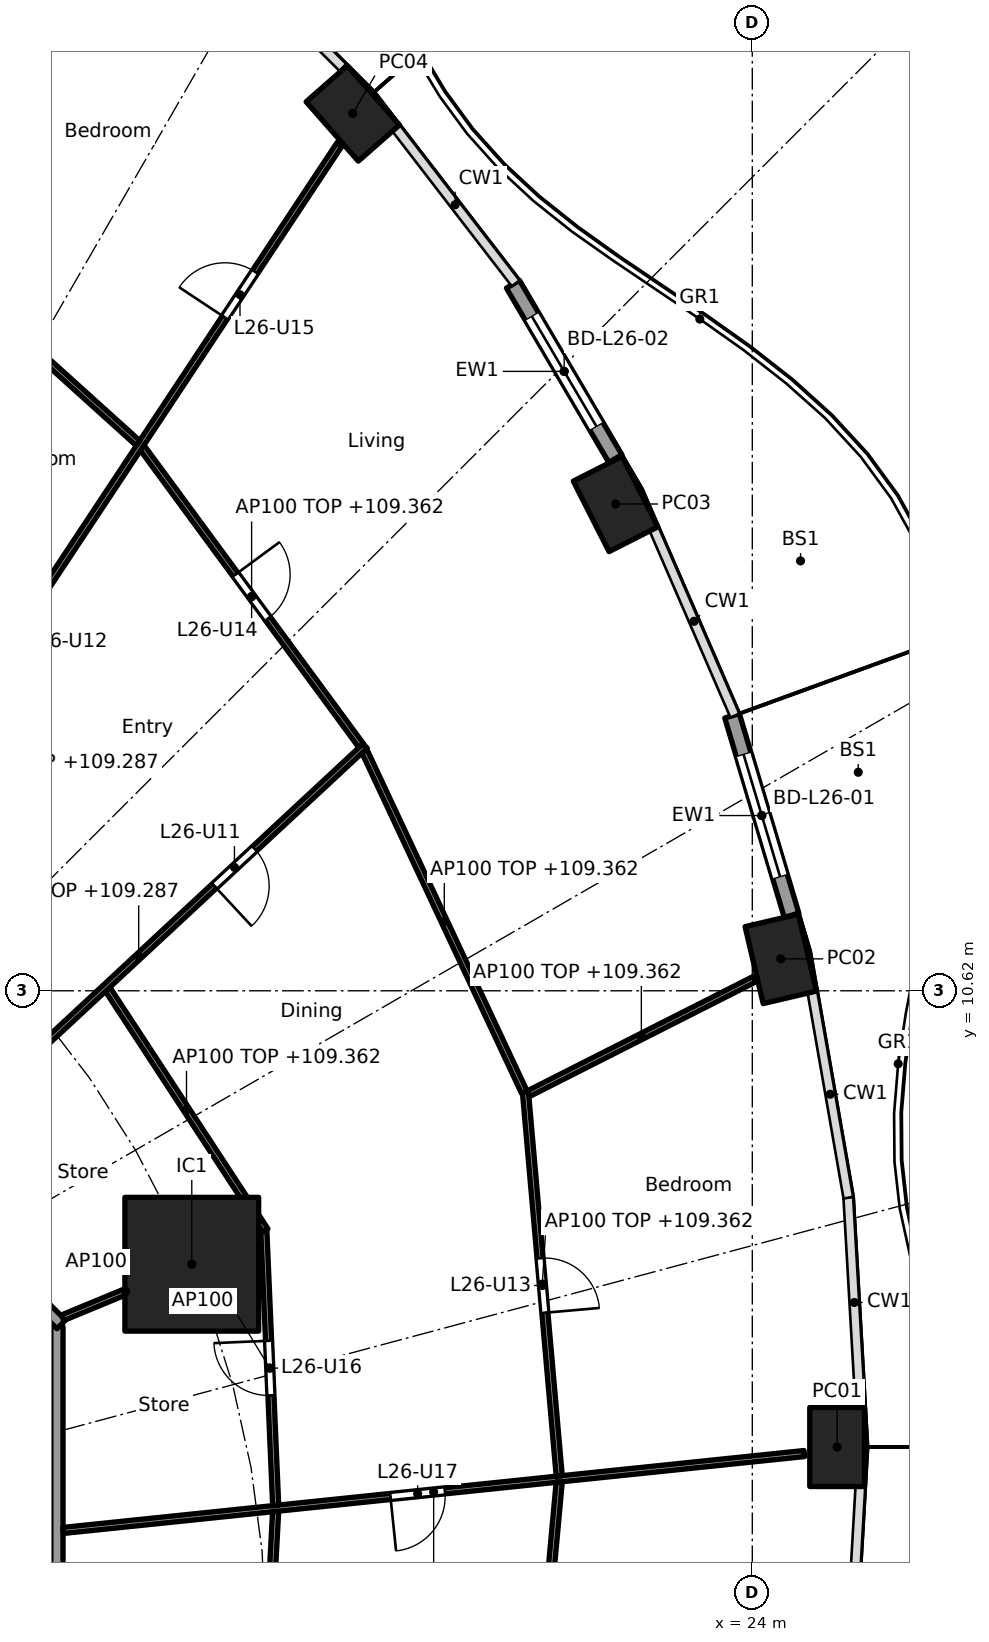
"""IFC4 building model, lengths in metres.
Left out: names, types, materials, properties, quantities, classifications, styles, units other than length and angle.
Written with IfcOpenShell. Run it as: python <this file> out.ifc"""

import sys

from ifc_helpers import new_model, si_unit, direction, frame, frame_2d, origin, origin_2d, place, context, subcontext, project, spatial, rectangle, hollow_rectangle, extrude, element, fill, save


model = new_model("IFC4")
c1 = context("Model", 3, precision=1e-05, world=origin(), true_north=direction((0.0, 1.0)))
c2 = subcontext(c1, "Body", "Model", "MODEL_VIEW")
j1 = project(units=[si_unit("LENGTHUNIT", "METRE"), si_unit("PLANEANGLEUNIT", "RADIAN")], contexts=[c1])
p1 = place(None, origin())
s1 = spatial("IfcSite", under=j1, at=p1, CompositionType="ELEMENT")
p2 = place(p1, origin())
s2 = spatial("IfcBuilding", under=s1, at=p2, CompositionType="ELEMENT")
p3 = place(p2, frame((0.0, 0.0, 106.6)))
s3 = spatial("IfcBuildingStorey", under=s2, at=p3, CompositionType="ELEMENT", Elevation=106.6)
for number, where, z_axis, x_axis in (
    (1, (25.395, 3.118, 0.0), (0.0, 0.0, 1.0), (0.0, 1.0, 0.0)),
    (2, (24.468, 11.145, 0.0), (0.0, 0.0, 1.0), (-0.229, 0.973, 0.0)),
    (3, (21.751, 18.625, 0.0), (0.0, 0.0, 1.0), (-0.452, 0.892, 0.0)),
    (4, (17.43, 25.049, 0.0), (0.0, 0.0, 1.0), (-0.66, 0.751, 0.0)),
):
    element("IfcColumn", number, at=place(p3, frame(where, z_axis=z_axis, x_axis=x_axis)), inside=s3, PredefinedType="COLUMN", context=c2, shape_type="SweptSolid", body=[
        extrude(hollow_rectangle(XDim=1.3, YDim=0.9, WallThickness=0.045, at=origin_2d()), origin(), (0.0, 0.0, 1.0), 3.7),
    ])
p4 = place(p3, frame((14.782, 6.123, 0.0), z_axis=(0.0, 0.0, 1.0), x_axis=(1.0, 0.0, 0.0)))
e5 = element("IfcColumn", 5, at=p4, inside=s3, PredefinedType="COLUMN", context=c2, shape_type="SweptSolid", body=[
    extrude(rectangle(XDim=2.2, YDim=2.2, at=origin_2d()), origin(), (0.0, 0.0, 1.0), 3.7),
])
p5 = place(p3, frame((23.667, 15.142, 0.0), z_axis=(0.0, 0.0, 1.0), x_axis=(0.285882094477, -0.958264800594, 0.0)))
e6 = element("IfcWall", 6, at=p5, inside=s3, PredefinedType="SOLIDWALL", context=c2, shape_type="SweptSolid", body=[
    extrude(rectangle(XDim=3.424, YDim=0.25, at=frame_2d((1.712, 0.0))), origin(), (0.0, 0.0, 1.0), 3.44),
])
p6 = place(p5, frame((0.662, 0.0, 0.0)))
e7 = element("IfcOpeningElement", 7, at=p6, cuts=e6, PredefinedType="OPENING", context=c2, shape_type="SweptSolid", body=[
    extrude(rectangle(XDim=2.1, YDim=2.4, at=frame_2d((1.05, 1.2))), frame((0.0, 0.135, 0.0), z_axis=(0.0, -1.0, 0.0), x_axis=(1.0, 0.0, 0.0)), (0.0, 0.0, 1.0), 0.27),
])
p7 = place(p3, frame((20.064, 22.24, 0.0), z_axis=(0.0, 0.0, 1.0), x_axis=(0.506297921217, -0.862358634775, 0.0)))
e8 = element("IfcWall", 8, at=p7, inside=s3, PredefinedType="SOLIDWALL", context=c2, shape_type="SweptSolid", body=[
    extrude(rectangle(XDim=3.325, YDim=0.25, at=frame_2d((1.662, 0.0))), origin(), (0.0, 0.0, 1.0), 3.44),
])
p8 = place(p7, frame((0.612, 0.0, 0.0)))
e9 = element("IfcOpeningElement", 9, at=p8, cuts=e8, PredefinedType="OPENING", context=c2, shape_type="SweptSolid", body=[
    extrude(rectangle(XDim=2.1, YDim=2.4, at=frame_2d((1.05, 1.2))), frame((0.0, 0.135, 0.0), z_axis=(0.0, -1.0, 0.0), x_axis=(1.0, 0.0, 0.0)), (0.0, 0.0, 1.0), 0.27),
])
p9 = place(p3, frame((12.565, -5.104, 0.0), z_axis=(0.0, 0.0, 1.0), x_axis=(0.0, 1.0, 0.0)))
e10 = element("IfcWall", 10, at=p9, inside=s3, PredefinedType="PARTITIONING", context=c2, shape_type="SweptSolid", body=[
    extrude(rectangle(XDim=10.209, YDim=0.2, at=frame_2d((5.104, 0.0))), origin(), (0.0, 0.0, 1.0), 3.44),
])
p10 = place(p3, frame((12.635, 5.134, 0.0), z_axis=(0.0, 0.0, 1.0), x_axis=(-0.707106781187, 0.707106781187, 0.0)))
e11 = element("IfcWall", 11, at=p10, inside=s3, PredefinedType="PARTITIONING", context=c2, shape_type="SweptSolid", body=[
    extrude(rectangle(XDim=10.609, YDim=0.2, at=frame_2d((5.305, 0.0))), origin(), (0.0, 0.0, 1.0), 3.44),
])
p11 = place(p10, frame((4.804, 0.0, 0.0)))
e12 = element("IfcOpeningElement", 12, at=p11, cuts=e11, PredefinedType="OPENING", context=c2, shape_type="SweptSolid", body=[
    extrude(rectangle(XDim=1.0, YDim=2.1, at=frame_2d((0.5, 1.05))), frame((0.0, 0.11, 0.0), z_axis=(0.0, -1.0, 0.0), x_axis=(1.0, 0.0, 0.0)), (0.0, 0.0, 1.0), 0.22),
])
p12 = place(p3, frame((12.664, 1.745, 0.0), z_axis=(0.0, 0.0, 1.0), x_axis=(0.994662790212, 0.103179134358, 0.0)))
e13 = element("IfcWall", 13, at=p12, inside=s3, PredefinedType="PARTITIONING", context=c2, shape_type="SweptSolid", body=[
    extrude(rectangle(XDim=12.257, YDim=0.1, at=frame_2d((6.128, 0.0))), origin(), (0.0, 0.0, 1.0), 2.687),
])
p13 = place(p12, frame((5.414, 0.0, 0.0)))
e14 = element("IfcOpeningElement", 14, at=p13, cuts=e13, PredefinedType="OPENING", context=c2, shape_type="SweptSolid", body=[
    extrude(rectangle(XDim=0.9, YDim=2.1, at=frame_2d((0.45, 1.05))), frame((0.0, 0.06, 0.0), z_axis=(0.0, -1.0, 0.0), x_axis=(1.0, 0.0, 0.0)), (0.0, 0.0, 1.0), 0.12),
])
p14 = place(p3, frame((16.162, 2.158, 0.0), z_axis=(0.0, 0.0, 1.0), x_axis=(-0.043120653248, 0.999069872063, 0.0)))
e15 = element("IfcWall", 15, at=p14, inside=s3, PredefinedType="PARTITIONING", context=c2, shape_type="SweptSolid", body=[
    extrude(rectangle(XDim=4.518, YDim=0.1, at=frame_2d((2.259, 0.0))), origin(), (0.0, 0.0, 1.0), 3.44),
])
p15 = place(p14, frame((1.809, 0.0, 0.0)))
e16 = element("IfcOpeningElement", 16, at=p15, cuts=e15, PredefinedType="OPENING", context=c2, shape_type="SweptSolid", body=[
    extrude(rectangle(XDim=0.9, YDim=2.1, at=frame_2d((0.45, 1.05))), frame((0.0, 0.06, 0.0), z_axis=(0.0, -1.0, 0.0), x_axis=(1.0, 0.0, 0.0)), (0.0, 0.0, 1.0), 0.12),
])
p16 = place(p3, frame((16.161, 2.058, 0.0), z_axis=(0.0, 0.0, 1.0), x_axis=(-0.053696394729, -0.998557307916, 0.0)))
e17 = element("IfcWall", 17, at=p16, inside=s3, PredefinedType="PARTITIONING", context=c2, shape_type="SweptSolid", body=[
    extrude(rectangle(XDim=4.742, YDim=0.1, at=frame_2d((2.371, 0.0))), origin(), (0.0, 0.0, 1.0), 2.762),
])
p17 = place(p16, frame((1.896, 0.0, 0.0)))
e18 = element("IfcOpeningElement", 18, at=p17, cuts=e17, PredefinedType="OPENING", context=c2, shape_type="SweptSolid", body=[
    extrude(rectangle(XDim=0.9, YDim=2.1, at=frame_2d((0.45, 1.05))), frame((0.0, 0.06, 0.0), z_axis=(0.0, -1.0, 0.0), x_axis=(1.0, 0.0, 0.0)), (0.0, 0.0, 1.0), 0.12),
])
p18 = place(p3, frame((20.825, 2.642, 0.0), z_axis=(0.0, 0.0, 1.0), x_axis=(-0.08776338161, 0.996141349834, 0.0)))
e19 = element("IfcWall", 19, at=p18, inside=s3, PredefinedType="PARTITIONING", context=c2, shape_type="SweptSolid", body=[
    extrude(rectangle(XDim=6.337, YDim=0.1, at=frame_2d((3.168, 0.0))), origin(), (0.0, 0.0, 1.0), 2.762),
])
p19 = place(p18, frame((2.694, 0.0, 0.0)))
e20 = element("IfcOpeningElement", 20, at=p19, cuts=e19, PredefinedType="OPENING", context=c2, shape_type="SweptSolid", body=[
    extrude(rectangle(XDim=0.9, YDim=2.1, at=frame_2d((0.45, 1.05))), frame((0.0, 0.06, 0.0), z_axis=(0.0, -1.0, 0.0), x_axis=(1.0, 0.0, 0.0)), (0.0, 0.0, 1.0), 0.12),
])
p20 = place(p3, frame((20.825, 2.542, 0.0), z_axis=(0.0, 0.0, 1.0), x_axis=(-0.09140211812, -0.995814065377, 0.0)))
e21 = element("IfcWall", 21, at=p20, inside=s3, PredefinedType="PARTITIONING", context=c2, shape_type="SweptSolid", body=[
    extrude(rectangle(XDim=6.403, YDim=0.1, at=frame_2d((3.201, 0.0))), origin(), (0.0, 0.0, 1.0), 2.762),
])
p21 = place(p20, frame((2.726, 0.0, 0.0)))
e22 = element("IfcOpeningElement", 22, at=p21, cuts=e21, PredefinedType="OPENING", context=c2, shape_type="SweptSolid", body=[
    extrude(rectangle(XDim=0.9, YDim=2.1, at=frame_2d((0.45, 1.05))), frame((0.0, 0.06, 0.0), z_axis=(0.0, -1.0, 0.0), x_axis=(1.0, 0.0, 0.0)), (0.0, 0.0, 1.0), 0.12),
])
p22 = place(p3, frame((12.657, 5.243, 0.0), z_axis=(0.0, 0.0, 1.0), x_axis=(0.923864733477, 0.382719158442, 0.0)))
e23 = element("IfcWall", 23, at=p22, inside=s3, PredefinedType="PARTITIONING", context=c2, shape_type="SweptSolid", body=[
    extrude(rectangle(XDim=2.25, YDim=0.1, at=frame_2d((1.125, 0.0))), origin(), (0.0, 0.0, 1.0), 3.44),
])
p23 = place(p3, frame((15.992, 6.68, 0.0), z_axis=(0.0, 0.0, 1.0), x_axis=(-0.547472878942, 0.836823426311, 0.0)))
e24 = element("IfcWall", 24, at=p23, inside=s3, PredefinedType="PARTITIONING", context=c2, shape_type="SweptSolid", body=[
    extrude(rectangle(XDim=4.738, YDim=0.1, at=frame_2d((2.369, 0.0))), origin(), (0.0, 0.0, 1.0), 2.762),
])
p24 = place(p3, frame((20.318, 8.927, 0.0), z_axis=(0.0, 0.0, 1.0), x_axis=(0.892057836959, 0.451921249246, 0.0)))
e25 = element("IfcWall", 25, at=p24, inside=s3, PredefinedType="PARTITIONING", context=c2, shape_type="SweptSolid", body=[
    extrude(rectangle(XDim=4.164, YDim=0.1, at=frame_2d((2.082, 0.0))), origin(), (0.0, 0.0, 1.0), 2.762),
])
p25 = place(p3, frame((20.252, 8.95, 0.0), z_axis=(0.0, 0.0, 1.0), x_axis=(-0.424580052627, 0.90539040138, 0.0)))
e26 = element("IfcWall", 26, at=p25, inside=s3, PredefinedType="PARTITIONING", context=c2, shape_type="SweptSolid", body=[
    extrude(rectangle(XDim=6.204, YDim=0.1, at=frame_2d((3.102, 0.0))), origin(), (0.0, 0.0, 1.0), 2.762),
])
p26 = place(p3, frame((10.185, 7.726, 0.0), z_axis=(0.0, 0.0, 1.0), x_axis=(0.732598472978, 0.680661059112, 0.0)))
e27 = element("IfcWall", 27, at=p26, inside=s3, PredefinedType="PARTITIONING", context=c2, shape_type="SweptSolid", body=[
    extrude(rectangle(XDim=10.167, YDim=0.1, at=frame_2d((5.084, 0.0))), origin(), (0.0, 0.0, 1.0), 2.687),
])
p27 = place(p26, frame((1.725, 0.0, 0.0)))
e28 = element("IfcOpeningElement", 28, at=p27, cuts=e27, PredefinedType="OPENING", context=c2, shape_type="SweptSolid", body=[
    extrude(rectangle(XDim=0.9, YDim=2.1, at=frame_2d((0.45, 1.05))), frame((0.0, 0.06, 0.0), z_axis=(0.0, -1.0, 0.0), x_axis=(1.0, 0.0, 0.0)), (0.0, 0.0, 1.0), 0.12),
])
p28 = place(p26, frame((6.784, 0.0, 0.0)))
e29 = element("IfcOpeningElement", 29, at=p28, cuts=e27, PredefinedType="OPENING", context=c2, shape_type="SweptSolid", body=[
    extrude(rectangle(XDim=0.9, YDim=2.1, at=frame_2d((0.45, 1.05))), frame((0.0, 0.06, 0.0), z_axis=(0.0, -1.0, 0.0), x_axis=(1.0, 0.0, 0.0)), (0.0, 0.0, 1.0), 0.12),
])
p29 = place(p3, frame((17.567, 14.653, 0.0), z_axis=(0.0, 0.0, 1.0), x_axis=(-0.592391983588, 0.80564988536, 0.0)))
e30 = element("IfcWall", 30, at=p29, inside=s3, PredefinedType="PARTITIONING", context=c2, shape_type="SweptSolid", body=[
    extrude(rectangle(XDim=6.08, YDim=0.1, at=frame_2d((3.04, 0.0))), origin(), (0.0, 0.0, 1.0), 2.762),
])
p30 = place(p29, frame((2.59, 0.0, 0.0)))
e31 = element("IfcOpeningElement", 31, at=p30, cuts=e30, PredefinedType="OPENING", context=c2, shape_type="SweptSolid", body=[
    extrude(rectangle(XDim=0.9, YDim=2.1, at=frame_2d((0.45, 1.05))), frame((0.0, 0.06, 0.0), z_axis=(0.0, -1.0, 0.0), x_axis=(1.0, 0.0, 0.0)), (0.0, 0.0, 1.0), 0.12),
])
p31 = place(p3, frame((7.713, 10.195, 0.0), z_axis=(0.0, 0.0, 1.0), x_axis=(0.552111071171, 0.833770571015, 0.0)))
e32 = element("IfcWall", 32, at=p31, inside=s3, PredefinedType="PARTITIONING", context=c2, shape_type="SweptSolid", body=[
    extrude(rectangle(XDim=17.208, YDim=0.1, at=frame_2d((8.604, 0.0))), origin(), (0.0, 0.0, 1.0), 2.687),
])
p32 = place(p31, frame((1.976, 0.0, 0.0)))
e33 = element("IfcOpeningElement", 33, at=p32, cuts=e32, PredefinedType="OPENING", context=c2, shape_type="SweptSolid", body=[
    extrude(rectangle(XDim=0.9, YDim=2.1, at=frame_2d((0.45, 1.05))), frame((0.0, 0.06, 0.0), z_axis=(0.0, -1.0, 0.0), x_axis=(1.0, 0.0, 0.0)), (0.0, 0.0, 1.0), 0.12),
])
p33 = place(p31, frame((7.611, 0.0, 0.0)))
e34 = element("IfcOpeningElement", 34, at=p33, cuts=e32, PredefinedType="OPENING", context=c2, shape_type="SweptSolid", body=[
    extrude(rectangle(XDim=0.9, YDim=2.1, at=frame_2d((0.45, 1.05))), frame((0.0, 0.06, 0.0), z_axis=(0.0, -1.0, 0.0), x_axis=(1.0, 0.0, 0.0)), (0.0, 0.0, 1.0), 0.12),
])
p34 = place(p31, frame((13.79, 0.0, 0.0)))
e35 = element("IfcOpeningElement", 35, at=p34, cuts=e32, PredefinedType="OPENING", context=c2, shape_type="SweptSolid", body=[
    extrude(rectangle(XDim=0.9, YDim=2.1, at=frame_2d((0.45, 1.05))), frame((0.0, 0.06, 0.0), z_axis=(0.0, -1.0, 0.0), x_axis=(1.0, 0.0, 0.0)), (0.0, 0.0, 1.0), 0.12),
])
p35 = place(p3, frame((13.898, 19.625, 0.0), z_axis=(0.0, 0.0, 1.0), x_axis=(-0.742396654702, 0.669960601146, 0.0)))
e36 = element("IfcWall", 36, at=p35, inside=s3, PredefinedType="PARTITIONING", context=c2, shape_type="SweptSolid", body=[
    extrude(rectangle(XDim=5.861, YDim=0.1, at=frame_2d((2.931, 0.0))), origin(), (0.0, 0.0, 1.0), 2.762),
])
p36 = place(p35, frame((3.958, 0.0, 0.0)))
e37 = element("IfcOpeningElement", 37, at=p36, cuts=e36, PredefinedType="OPENING", context=c2, shape_type="SweptSolid", body=[
    extrude(rectangle(XDim=0.9, YDim=2.1, at=frame_2d((0.45, 1.05))), frame((0.0, 0.06, 0.0), z_axis=(0.0, -1.0, 0.0), x_axis=(1.0, 0.0, 0.0)), (0.0, 0.0, 1.0), 0.12),
])
p37 = place(p6, origin())
e38 = element("IfcDoor", 38, at=p37, inside=s3, OperationType="SLIDING_TO_LEFT", PredefinedType="DOOR", context=c2, shape_type="SweptSolid", body=[
    extrude(rectangle(XDim=2.1, YDim=2.4, at=frame_2d((1.05, 1.2))), frame((0.0, 0.025, 0.0), z_axis=(0.0, -1.0, 0.0), x_axis=(1.0, 0.0, 0.0)), (0.0, 0.0, 1.0), 0.05),
])
fill(e7, e38)
p38 = place(p8, origin())
e39 = element("IfcDoor", 39, at=p38, inside=s3, OperationType="SLIDING_TO_LEFT", PredefinedType="DOOR", context=c2, shape_type="SweptSolid", body=[
    extrude(rectangle(XDim=2.1, YDim=2.4, at=frame_2d((1.05, 1.2))), frame((0.0, 0.025, 0.0), z_axis=(0.0, -1.0, 0.0), x_axis=(1.0, 0.0, 0.0)), (0.0, 0.0, 1.0), 0.05),
])
fill(e9, e39)
p39 = place(p28, frame((0.9, 0.0, 0.0), x_axis=(-1.0, 0.0, 0.0)))
e40 = element("IfcDoor", 40, at=p39, inside=s3, OperationType="SINGLE_SWING_RIGHT", PredefinedType="DOOR", context=c2, shape_type="SweptSolid", body=[
    extrude(rectangle(XDim=0.9, YDim=2.1, at=frame_2d((0.45, 1.05))), frame((0.0, 0.025, 0.0), z_axis=(0.0, -1.0, 0.0), x_axis=(1.0, 0.0, 0.0)), (0.0, 0.0, 1.0), 0.05),
])
fill(e29, e40)
p40 = place(p19, frame((0.9, 0.0, 0.0), x_axis=(-1.0, 0.0, 0.0)))
e41 = element("IfcDoor", 41, at=p40, inside=s3, OperationType="SINGLE_SWING_RIGHT", PredefinedType="DOOR", context=c2, shape_type="SweptSolid", body=[
    extrude(rectangle(XDim=0.9, YDim=2.1, at=frame_2d((0.45, 1.05))), frame((0.0, 0.025, 0.0), z_axis=(0.0, -1.0, 0.0), x_axis=(1.0, 0.0, 0.0)), (0.0, 0.0, 1.0), 0.05),
])
fill(e20, e41)
p41 = place(p30, frame((0.9, 0.0, 0.0), x_axis=(-1.0, 0.0, 0.0)))
e42 = element("IfcDoor", 42, at=p41, inside=s3, OperationType="SINGLE_SWING_LEFT", PredefinedType="DOOR", context=c2, shape_type="SweptSolid", body=[
    extrude(rectangle(XDim=0.9, YDim=2.1, at=frame_2d((0.45, 1.05))), frame((0.0, 0.025, 0.0), z_axis=(0.0, -1.0, 0.0), x_axis=(1.0, 0.0, 0.0)), (0.0, 0.0, 1.0), 0.05),
])
fill(e31, e42)
p42 = place(p34, origin())
e43 = element("IfcDoor", 43, at=p42, inside=s3, OperationType="SINGLE_SWING_LEFT", PredefinedType="DOOR", context=c2, shape_type="SweptSolid", body=[
    extrude(rectangle(XDim=0.9, YDim=2.1, at=frame_2d((0.45, 1.05))), frame((0.0, 0.025, 0.0), z_axis=(0.0, -1.0, 0.0), x_axis=(1.0, 0.0, 0.0)), (0.0, 0.0, 1.0), 0.05),
])
fill(e35, e43)
p43 = place(p15, origin())
e44 = element("IfcDoor", 44, at=p43, inside=s3, OperationType="SINGLE_SWING_RIGHT", PredefinedType="DOOR", context=c2, shape_type="SweptSolid", body=[
    extrude(rectangle(XDim=0.9, YDim=2.1, at=frame_2d((0.45, 1.05))), frame((0.0, 0.025, 0.0), z_axis=(0.0, -1.0, 0.0), x_axis=(1.0, 0.0, 0.0)), (0.0, 0.0, 1.0), 0.05),
])
fill(e16, e44)
p44 = place(p13, frame((0.9, 0.0, 0.0), x_axis=(-1.0, 0.0, 0.0)))
e45 = element("IfcDoor", 45, at=p44, inside=s3, OperationType="SINGLE_SWING_RIGHT", PredefinedType="DOOR", context=c2, shape_type="SweptSolid", body=[
    extrude(rectangle(XDim=0.9, YDim=2.1, at=frame_2d((0.45, 1.05))), frame((0.0, 0.025, 0.0), z_axis=(0.0, -1.0, 0.0), x_axis=(1.0, 0.0, 0.0)), (0.0, 0.0, 1.0), 0.05),
])
fill(e14, e45)
save(model, sys.argv[1])
